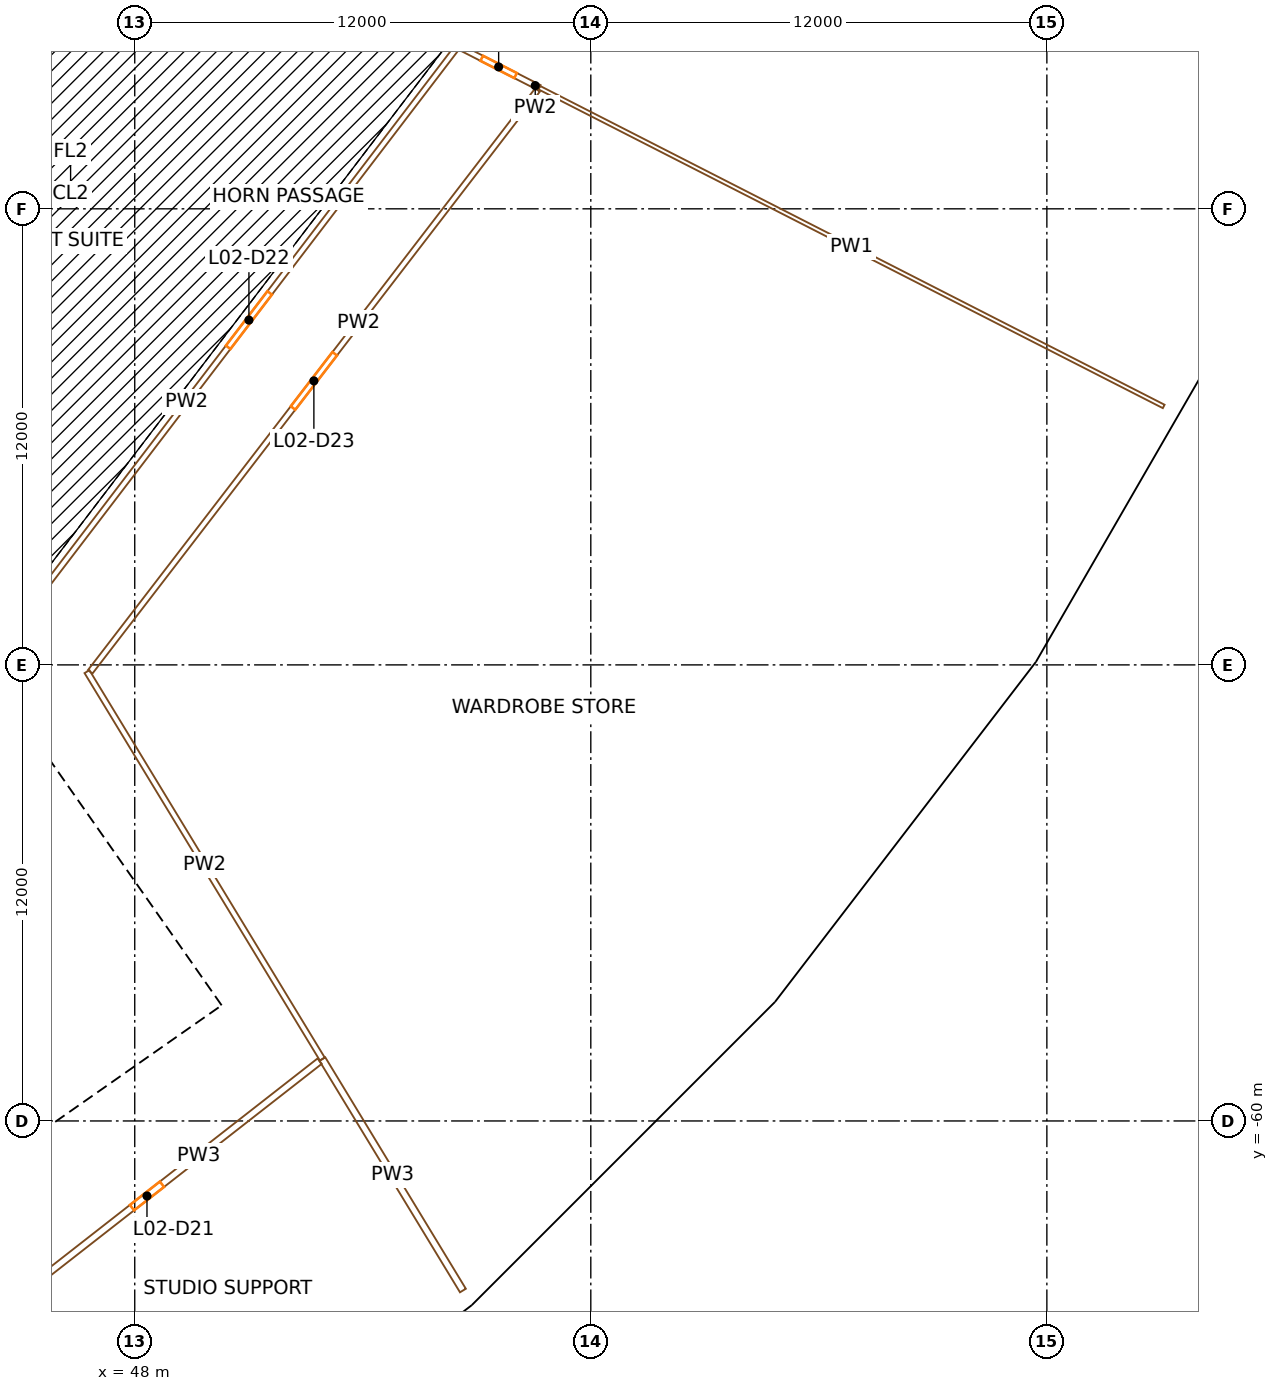
"""IFC4 building model, lengths in metres.
Left out: names, types, materials, properties, quantities, classifications, styles, units other than length and angle.
Written with IfcOpenShell. Run it as: python <this file> out.ifc"""

import sys

from ifc_helpers import new_model, si_unit, direction, frame, frame_2d, origin, origin_2d, place, context, subcontext, project, spatial, rectangle, extrude, element, fill, save


model = new_model("IFC4")
c1 = context("Model", 3, precision=1e-05, world=origin(), true_north=direction((0.0, 1.0)))
c2 = subcontext(c1, "Body", "Model", "MODEL_VIEW")
j1 = project(units=[si_unit("LENGTHUNIT", "METRE"), si_unit("PLANEANGLEUNIT", "RADIAN")], contexts=[c1])
p1 = place(None, origin())
s1 = spatial("IfcSite", under=j1, at=p1, CompositionType="ELEMENT")
p2 = place(p1, origin())
s2 = spatial("IfcBuilding", under=s1, at=p2, CompositionType="ELEMENT")
p3 = place(p2, frame((0.0, 0.0, 18.0)))
s3 = spatial("IfcBuildingStorey", under=s2, at=p3, CompositionType="ELEMENT", Elevation=18.0)
p4 = place(p3, frame((51.264, -58.456, 0.0), z_axis=(0.0, 0.0, 1.0), x_axis=(0.751839807479, 0.6593458151, 0.0)))
e1 = element("IfcColumn", 1, at=p4, inside=s3, PredefinedType="COLUMN", context=c2, shape_type="SweptSolid", body=[
    extrude(rectangle(XDim=1.4, YDim=1.8, at=origin_2d()), origin(), (0.0, 0.0, 1.0), 9.0),
])
p5 = place(p3, frame((56.209, -64.094, 0.0), z_axis=(0.0, 0.0, 1.0), x_axis=(0.751839807479, 0.6593458151, 0.0)))
e2 = element("IfcColumn", 2, at=p5, inside=s3, PredefinedType="COLUMN", context=c2, shape_type="SweptSolid", body=[
    extrude(rectangle(XDim=1.1, YDim=1.3, at=origin_2d()), origin(), (0.0, 0.0, 1.0), 9.0),
])
p6 = place(p3, frame((58.456, -51.264, 0.0), z_axis=(0.0, 0.0, 1.0), x_axis=(0.6593458151, 0.751839807479, 0.0)))
e3 = element("IfcColumn", 3, at=p6, inside=s3, PredefinedType="COLUMN", context=c2, shape_type="SweptSolid", body=[
    extrude(rectangle(XDim=1.4, YDim=1.8, at=origin_2d()), origin(), (0.0, 0.0, 1.0), 9.0),
])
p7 = place(p3, frame((64.094, -56.209, 0.0), z_axis=(0.0, 0.0, 1.0), x_axis=(0.6593458151, 0.751839807479, 0.0)))
e4 = element("IfcColumn", 4, at=p7, inside=s3, PredefinedType="COLUMN", context=c2, shape_type="SweptSolid", body=[
    extrude(rectangle(XDim=1.1, YDim=1.3, at=origin_2d()), origin(), (0.0, 0.0, 1.0), 9.0),
])
for number, where, z_axis, x_axis in (
    (5, (48.433, -32.362, 0.0), (0.0, 0.0, 1.0), (0.556, 0.831, 0.0)),
    (6, (64.647, -43.196, 0.0), (0.0, 0.0, 1.0), (0.556, 0.831, 0.0)),
):
    element("IfcColumn", number, at=place(p3, frame(where, z_axis=z_axis, x_axis=x_axis)), inside=s3, PredefinedType="COLUMN", context=c2, shape_type="SweptSolid", body=[
        extrude(rectangle(XDim=1.4, YDim=1.8, at=origin_2d()), origin(), (0.0, 0.0, 1.0), 9.0),
    ])
p8 = place(p3, frame((70.883, -47.362, 0.0), z_axis=(0.0, 0.0, 1.0), x_axis=(0.55557023302, 0.831469612303, 0.0)))
e7 = element("IfcColumn", 7, at=p8, inside=s3, PredefinedType="COLUMN", context=c2, shape_type="SweptSolid", body=[
    extrude(rectangle(XDim=1.1, YDim=1.3, at=origin_2d()), origin(), (0.0, 0.0, 1.0), 9.0),
])
p9 = place(p3, frame((69.732, -34.388, 0.0), z_axis=(0.0, 0.0, 1.0), x_axis=(0.442288690219, 0.896872741533, 0.0)))
e8 = element("IfcColumn", 8, at=p9, inside=s3, PredefinedType="COLUMN", context=c2, shape_type="SweptSolid", body=[
    extrude(rectangle(XDim=1.4, YDim=1.8, at=origin_2d()), origin(), (0.0, 0.0, 1.0), 9.0),
])
p10 = place(p3, frame((76.458, -37.705, 0.0), z_axis=(0.0, 0.0, 1.0), x_axis=(0.442288690219, 0.896872741533, 0.0)))
e9 = element("IfcColumn", 9, at=p10, inside=s3, PredefinedType="COLUMN", context=c2, shape_type="SweptSolid", body=[
    extrude(rectangle(XDim=1.1, YDim=1.3, at=origin_2d()), origin(), (0.0, 0.0, 1.0), 9.0),
])
p11 = place(p3, frame((49.779, -57.191, 0.0), z_axis=(0.0, 0.0, 1.0), x_axis=(-0.573577477574, 0.819151315216, 0.0)))
e10 = element("IfcWall", 10, at=p11, inside=s3, PredefinedType="SHEAR", context=c2, shape_type="SweptSolid", body=[
    extrude(rectangle(XDim=14.8, YDim=0.9, at=frame_2d((7.4, 0.0))), origin(), (0.0, 0.0, 1.0), 8.6),
])
p12 = place(p11, frame((6.7, 0.0, 0.0)))
e11 = element("IfcOpeningElement", 11, at=p12, cuts=e10, PredefinedType="OPENING", context=c2, shape_type="SweptSolid", body=[
    extrude(rectangle(XDim=1.4, YDim=2.1, at=frame_2d((0.7, 1.05))), frame((0.0, 0.46, 0.0), z_axis=(0.0, -1.0, 0.0), x_axis=(1.0, 0.0, 0.0)), (0.0, 0.0, 1.0), 0.92),
])
p13 = place(p3, frame((36.827, -65.71, 0.0), z_axis=(0.0, 0.0, 1.0), x_axis=(0.819153391756, 0.573574511963, 0.0)))
e12 = element("IfcWall", 12, at=p13, inside=s3, PredefinedType="SHEAR", context=c2, shape_type="SweptSolid", body=[
    extrude(rectangle(XDim=15.045, YDim=0.9, at=frame_2d((7.523, 0.0))), origin(), (0.0, 0.0, 1.0), 8.6),
])
p14 = place(p13, frame((1.05, 0.0, 0.0)))
e13 = element("IfcOpeningElement", 13, at=p14, cuts=e12, PredefinedType="OPENING", context=c2, shape_type="SweptSolid", body=[
    extrude(rectangle(XDim=1.0, YDim=2.1, at=frame_2d((0.5, 1.05))), frame((0.0, 0.46, 0.0), z_axis=(0.0, -1.0, 0.0), x_axis=(1.0, 0.0, 0.0)), (0.0, 0.0, 1.0), 0.92),
])
p15 = place(p13, frame((3.625, 0.0, 0.0)))
e14 = element("IfcOpeningElement", 14, at=p15, cuts=e12, PredefinedType="OPENING", context=c2, shape_type="SweptSolid", body=[
    extrude(rectangle(XDim=1.0, YDim=2.1, at=frame_2d((0.5, 1.05))), frame((0.0, 0.46, 0.0), z_axis=(0.0, -1.0, 0.0), x_axis=(1.0, 0.0, 0.0)), (0.0, 0.0, 1.0), 0.92),
])
p16 = place(p13, frame((6.075, 0.0, 0.0)))
e15 = element("IfcOpeningElement", 15, at=p16, cuts=e12, PredefinedType="OPENING", context=c2, shape_type="SweptSolid", body=[
    extrude(rectangle(XDim=1.0, YDim=2.1, at=frame_2d((0.5, 1.05))), frame((0.0, 0.46, 0.0), z_axis=(0.0, -1.0, 0.0), x_axis=(1.0, 0.0, 0.0)), (0.0, 0.0, 1.0), 0.92),
])
p17 = place(p13, frame((13.495, 0.0, 0.0)))
e16 = element("IfcOpeningElement", 16, at=p17, cuts=e12, PredefinedType="OPENING", context=c2, shape_type="SweptSolid", body=[
    extrude(rectangle(XDim=1.1, YDim=2.1, at=frame_2d((0.55, 1.05))), frame((0.0, 0.46, 0.0), z_axis=(0.0, -1.0, 0.0), x_axis=(1.0, 0.0, 0.0)), (0.0, 0.0, 1.0), 0.92),
])
p18 = place(p3, frame((41.262, -57.661, 0.0), z_axis=(0.0, 0.0, 1.0), x_axis=(0.819164398642, 0.573558792102, 0.0)))
e17 = element("IfcWall", 17, at=p18, inside=s3, PredefinedType="SOLIDWALL", context=c2, shape_type="SweptSolid", body=[
    extrude(rectangle(XDim=6.795, YDim=0.3, at=frame_2d((3.397, 0.0))), origin(), (0.0, 0.0, 1.0), 8.6),
])
p19 = place(p18, frame((5.32, 0.0, 0.0)))
e18 = element("IfcOpeningElement", 18, at=p19, cuts=e17, PredefinedType="OPENING", context=c2, shape_type="SweptSolid", body=[
    extrude(rectangle(XDim=1.1, YDim=2.1, at=frame_2d((0.55, 1.05))), frame((0.0, 0.16, 0.0), z_axis=(0.0, -1.0, 0.0), x_axis=(1.0, 0.0, 0.0)), (0.0, 0.0, 1.0), 0.32),
])
p20 = place(p3, frame((46.778, -55.782, 0.0), z_axis=(0.0, 0.0, 1.0), x_axis=(0.573822822947, -0.818979467304, 0.0)))
e19 = element("IfcWall", 19, at=p20, inside=s3, PredefinedType="SOLIDWALL", context=c2, shape_type="SweptSolid", body=[
    extrude(rectangle(XDim=0.5, YDim=0.3, at=frame_2d((0.25, 0.0))), origin(), (0.0, 0.0, 1.0), 4.3),
])
p21 = place(p3, frame((47.839, -71.491, 0.0), z_axis=(0.0, 0.0, 1.0), x_axis=(0.793355377778, 0.608758773695, 0.0)))
e20 = element("IfcWall", 20, at=p21, inside=s3, PredefinedType="SOLIDWALL", context=c2, shape_type="SweptSolid", body=[
    extrude(rectangle(XDim=11.135, YDim=0.45, at=frame_2d((5.567, 0.0))), origin(), (0.0, 0.0, 1.0), 7.7),
])
p22 = place(p3, frame((56.699, -64.698, 0.0), z_axis=(0.0, 0.0, 1.0), x_axis=(0.707106781187, 0.707106781187, 0.0)))
e21 = element("IfcWall", 21, at=p22, inside=s3, PredefinedType="SOLIDWALL", context=c2, shape_type="SweptSolid", body=[
    extrude(rectangle(XDim=11.312, YDim=0.45, at=frame_2d((5.656, 0.0))), origin(), (0.0, 0.0, 1.0), 7.7),
])
p23 = place(p3, frame((64.713, -56.673, 0.0), z_axis=(0.0, 0.0, 1.0), x_axis=(0.608758773695, 0.793355377778, 0.0)))
e22 = element("IfcWall", 22, at=p23, inside=s3, PredefinedType="SOLIDWALL", context=c2, shape_type="SweptSolid", body=[
    extrude(rectangle(XDim=11.135, YDim=0.45, at=frame_2d((5.567, 0.0))), origin(), (0.0, 0.0, 1.0), 7.7),
])
p24 = place(p3, frame((71.512, -47.819, 0.0), z_axis=(0.0, 0.0, 1.0), x_axis=(0.500001430823, 0.866024577697, 0.0)))
e23 = element("IfcWall", 23, at=p24, inside=s3, PredefinedType="SOLIDWALL", context=c2, shape_type="SweptSolid", body=[
    extrude(rectangle(XDim=11.312, YDim=0.45, at=frame_2d((5.656, 0.0))), origin(), (0.0, 0.0, 1.0), 7.7),
])
p25 = place(p3, frame((52.865, -58.427, 0.0), z_axis=(0.0, 0.0, 1.0), x_axis=(-0.788252635542, -0.615351755146, 0.0)))
e24 = element("IfcWall", 24, at=p25, inside=s3, PredefinedType="PARTITIONING", context=c2, shape_type="SweptSolid", body=[
    extrude(rectangle(XDim=11.526, YDim=0.18, at=frame_2d((5.763, 0.0))), origin(), (0.0, 0.0, 1.0), 7.6),
])
p26 = place(p25, frame((5.263, 0.0, 0.0)))
e25 = element("IfcOpeningElement", 25, at=p26, cuts=e24, PredefinedType="OPENING", context=c2, shape_type="SweptSolid", body=[
    extrude(rectangle(XDim=1.0, YDim=2.1, at=frame_2d((0.5, 1.05))), frame((0.0, 0.1, 0.0), z_axis=(0.0, -1.0, 0.0), x_axis=(1.0, 0.0, 0.0)), (0.0, 0.0, 1.0), 0.2),
])
p27 = place(p3, frame((45.549, -46.076, 0.0), z_axis=(0.0, 0.0, 1.0), x_axis=(0.606707633542, 0.794925057727, 0.0)))
e26 = element("IfcWall", 26, at=p27, inside=s3, PredefinedType="PARTITIONING", context=c2, shape_type="SweptSolid", body=[
    extrude(rectangle(XDim=17.985, YDim=0.15, at=frame_2d((8.992, 0.0))), origin(), (0.0, 0.0, 1.0), 7.6),
])
p28 = place(p27, frame((8.092, 0.0, 0.0)))
e27 = element("IfcOpeningElement", 27, at=p28, cuts=e26, PredefinedType="OPENING", context=c2, shape_type="SweptSolid", body=[
    extrude(rectangle(XDim=1.8, YDim=2.1, at=frame_2d((0.9, 1.05))), frame((0.0, 0.085, 0.0), z_axis=(0.0, -1.0, 0.0), x_axis=(1.0, 0.0, 0.0)), (0.0, 0.0, 1.0), 0.17),
])
p29 = place(p3, frame((46.743, -48.177, 0.0), z_axis=(0.0, 0.0, 1.0), x_axis=(0.519168806698, -0.854671720693, 0.0)))
e28 = element("IfcWall", 28, at=p29, inside=s3, PredefinedType="PARTITIONING", context=c2, shape_type="SweptSolid", body=[
    extrude(rectangle(XDim=11.927, YDim=0.15, at=frame_2d((5.964, 0.0))), origin(), (0.0, 0.0, 1.0), 7.6),
])
p30 = place(p3, frame((58.599, -32.872, 0.0), z_axis=(0.0, 0.0, 1.0), x_axis=(-0.609502407435, -0.792784217383, 0.0)))
e29 = element("IfcWall", 29, at=p30, inside=s3, PredefinedType="PARTITIONING", context=c2, shape_type="SweptSolid", body=[
    extrude(rectangle(XDim=19.312, YDim=0.15, at=frame_2d((9.656, 0.0))), origin(), (0.0, 0.0, 1.0), 7.6),
])
p31 = place(p30, frame((8.756, 0.0, 0.0)))
e30 = element("IfcOpeningElement", 30, at=p31, cuts=e29, PredefinedType="OPENING", context=c2, shape_type="SweptSolid", body=[
    extrude(rectangle(XDim=1.8, YDim=2.1, at=frame_2d((0.9, 1.05))), frame((0.0, 0.085, 0.0), z_axis=(0.0, -1.0, 0.0), x_axis=(1.0, 0.0, 0.0)), (0.0, 0.0, 1.0), 0.17),
])
p32 = place(p3, frame((52.936, -58.372, 0.0), z_axis=(0.0, 0.0, 1.0), x_axis=(0.519148894699, -0.854683815883, 0.0)))
e31 = element("IfcWall", 31, at=p32, inside=s3, PredefinedType="PARTITIONING", context=c2, shape_type="SweptSolid", body=[
    extrude(rectangle(XDim=7.125, YDim=0.18, at=frame_2d((3.563, 0.0))), origin(), (0.0, 0.0, 1.0), 7.6),
])
p33 = place(p3, frame((56.505, -31.72, 0.0), z_axis=(0.0, 0.0, 1.0), x_axis=(0.890655190194, -0.454679372944, 0.0)))
e32 = element("IfcWall", 32, at=p33, inside=s3, PredefinedType="PARTITIONING", context=c2, shape_type="SweptSolid", body=[
    extrude(rectangle(XDim=2.402, YDim=0.15, at=frame_2d((1.201, 0.0))), origin(), (0.0, 0.0, 1.0), 7.6),
])
p34 = place(p33, frame((0.701, 0.0, 0.0)))
e33 = element("IfcOpeningElement", 33, at=p34, cuts=e32, PredefinedType="OPENING", context=c2, shape_type="SweptSolid", body=[
    extrude(rectangle(XDim=1.0, YDim=2.1, at=frame_2d((0.5, 1.05))), frame((0.0, 0.085, 0.0), z_axis=(0.0, -1.0, 0.0), x_axis=(1.0, 0.0, 0.0)), (0.0, 0.0, 1.0), 0.17),
])
p35 = place(p3, frame((75.074, -41.2, 0.0), z_axis=(0.0, 0.0, 1.0), x_axis=(-0.890653048048, 0.454683569093, 0.0)))
e34 = element("IfcWall", 34, at=p35, inside=s3, PredefinedType="PARTITIONING", context=c2, shape_type="SweptSolid", body=[
    extrude(rectangle(XDim=18.447, YDim=0.1, at=frame_2d((9.223, 0.0))), origin(), (0.0, 0.0, 1.0), 7.6),
])
p36 = place(p12, origin())
e35 = element("IfcDoor", 35, at=p36, inside=s3, OperationType="DOUBLE_DOOR_SINGLE_SWING", PredefinedType="DOOR", context=c2, shape_type="SweptSolid", body=[
    extrude(rectangle(XDim=1.4, YDim=2.1, at=frame_2d((0.7, 1.05))), frame((0.0, 0.025, 0.0), z_axis=(0.0, -1.0, 0.0), x_axis=(1.0, 0.0, 0.0)), (0.0, 0.0, 1.0), 0.05),
])
fill(e11, e35)
p37 = place(p17, origin())
e36 = element("IfcDoor", 36, at=p37, inside=s3, OperationType="SINGLE_SWING_LEFT", PredefinedType="DOOR", context=c2, shape_type="SweptSolid", body=[
    extrude(rectangle(XDim=1.1, YDim=2.1, at=frame_2d((0.55, 1.05))), frame((0.0, 0.025, 0.0), z_axis=(0.0, -1.0, 0.0), x_axis=(1.0, 0.0, 0.0)), (0.0, 0.0, 1.0), 0.05),
])
fill(e16, e36)
p38 = place(p19, origin())
e37 = element("IfcDoor", 37, at=p38, inside=s3, OperationType="SINGLE_SWING_LEFT", PredefinedType="DOOR", context=c2, shape_type="SweptSolid", body=[
    extrude(rectangle(XDim=1.1, YDim=2.1, at=frame_2d((0.55, 1.05))), frame((0.0, 0.025, 0.0), z_axis=(0.0, -1.0, 0.0), x_axis=(1.0, 0.0, 0.0)), (0.0, 0.0, 1.0), 0.05),
])
fill(e18, e37)
p39 = place(p26, origin())
e38 = element("IfcDoor", 38, at=p39, inside=s3, OperationType="SINGLE_SWING_RIGHT", PredefinedType="DOOR", context=c2, shape_type="SweptSolid", body=[
    extrude(rectangle(XDim=1.0, YDim=2.1, at=frame_2d((0.5, 1.05))), frame((0.0, 0.025, 0.0), z_axis=(0.0, -1.0, 0.0), x_axis=(1.0, 0.0, 0.0)), (0.0, 0.0, 1.0), 0.05),
])
fill(e25, e38)
p40 = place(p28, origin())
e39 = element("IfcDoor", 39, at=p40, inside=s3, OperationType="DOUBLE_DOOR_SINGLE_SWING", PredefinedType="DOOR", context=c2, shape_type="SweptSolid", body=[
    extrude(rectangle(XDim=1.8, YDim=2.1, at=frame_2d((0.9, 1.05))), frame((0.0, 0.025, 0.0), z_axis=(0.0, -1.0, 0.0), x_axis=(1.0, 0.0, 0.0)), (0.0, 0.0, 1.0), 0.05),
])
fill(e27, e39)
p41 = place(p31, origin())
e40 = element("IfcDoor", 40, at=p41, inside=s3, OperationType="DOUBLE_DOOR_SINGLE_SWING", PredefinedType="DOOR", context=c2, shape_type="SweptSolid", body=[
    extrude(rectangle(XDim=1.8, YDim=2.1, at=frame_2d((0.9, 1.05))), frame((0.0, 0.025, 0.0), z_axis=(0.0, -1.0, 0.0), x_axis=(1.0, 0.0, 0.0)), (0.0, 0.0, 1.0), 0.05),
])
fill(e30, e40)
p42 = place(p34, origin())
e41 = element("IfcDoor", 41, at=p42, inside=s3, OperationType="SINGLE_SWING_RIGHT", PredefinedType="DOOR", context=c2, shape_type="SweptSolid", body=[
    extrude(rectangle(XDim=1.0, YDim=2.1, at=frame_2d((0.5, 1.05))), frame((0.0, 0.025, 0.0), z_axis=(0.0, -1.0, 0.0), x_axis=(1.0, 0.0, 0.0)), (0.0, 0.0, 1.0), 0.05),
])
fill(e33, e41)
save(model, sys.argv[1])
